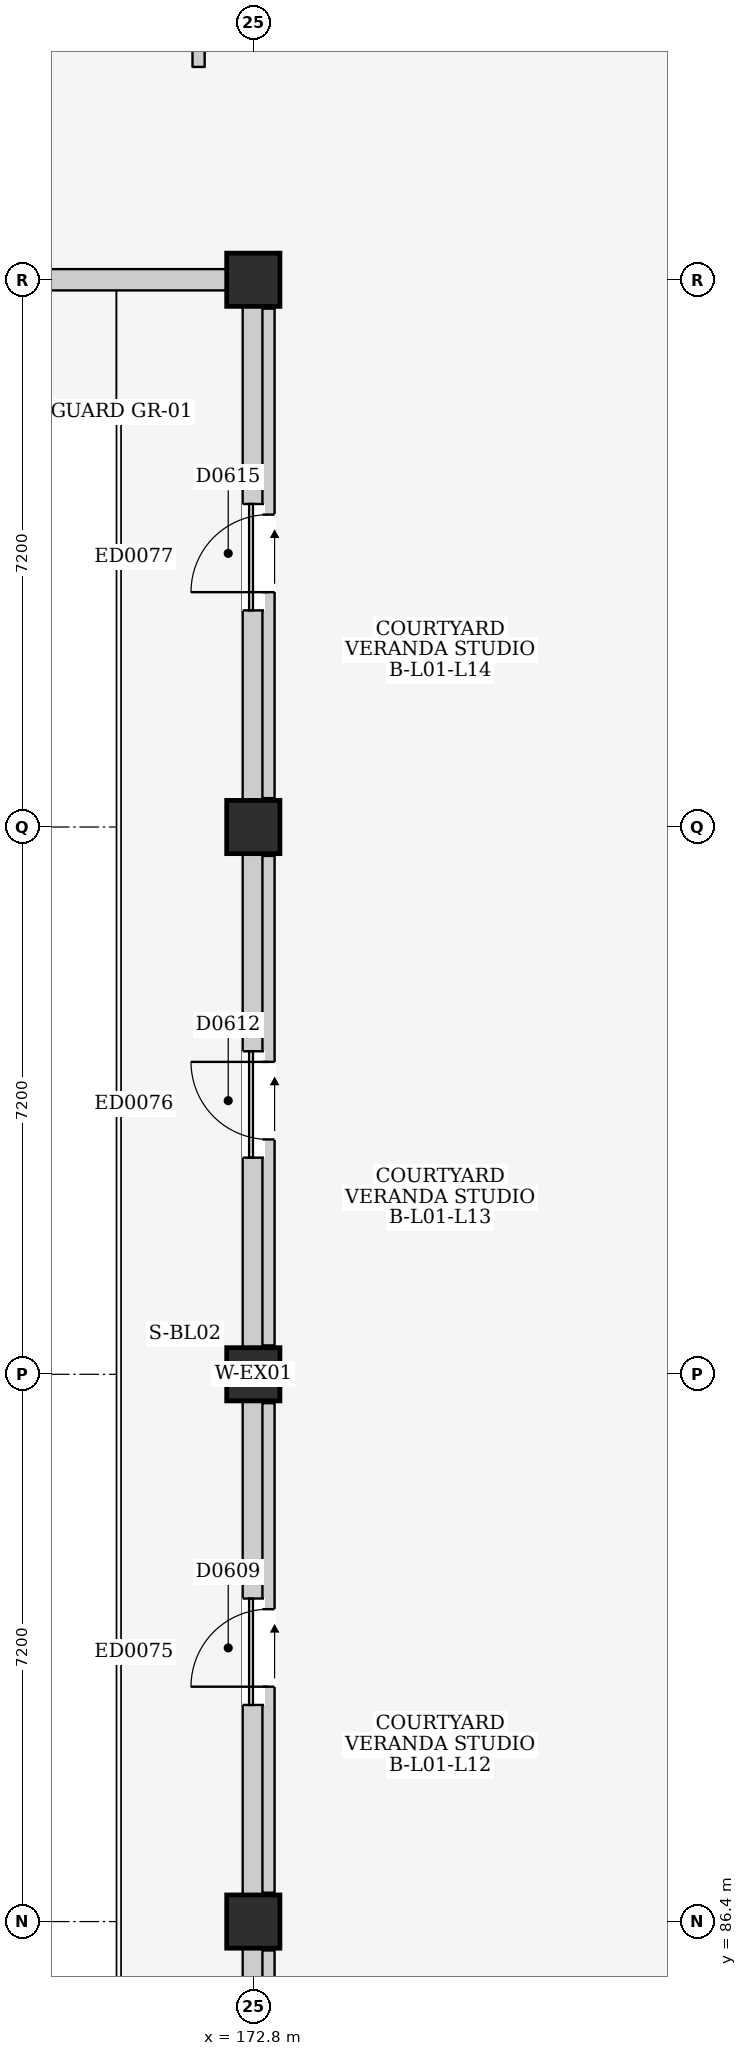
"""IFC4 building model, lengths in metres.
Left out: names, types, materials, properties, quantities, classifications, styles, units other than length and angle.
Written with IfcOpenShell. Run it as: python <this file> out.ifc"""

import sys

from ifc_helpers import new_model, si_unit, direction, frame, frame_2d, origin, origin_2d, place, context, subcontext, project, spatial, rectangle, extrude, element, fill, save


model = new_model("IFC4")
c1 = context("Model", 3, precision=1e-05, world=origin(), true_north=direction((0.0, 1.0)))
c2 = subcontext(c1, "Body", "Model", "MODEL_VIEW")
j1 = project(units=[si_unit("LENGTHUNIT", "METRE"), si_unit("PLANEANGLEUNIT", "RADIAN")], contexts=[c1])
p1 = place(None, origin())
s1 = spatial("IfcSite", under=j1, at=p1, CompositionType="ELEMENT")
p2 = place(p1, origin())
s2 = spatial("IfcBuilding", under=s1, at=p2, CompositionType="ELEMENT")
p3 = place(p2, frame((0.0, 0.0, 4.5)))
s3 = spatial("IfcBuildingStorey", under=s2, at=p3, CompositionType="ELEMENT", Elevation=4.5)
for number, where, z_axis, x_axis in (
    (1, (172.8, 86.4, 0.0), (0.0, 0.0, 1.0), (1.0, 0.0, 0.0)),
    (2, (172.8, 93.6, 0.0), (0.0, 0.0, 1.0), (1.0, 0.0, 0.0)),
    (3, (172.8, 100.8, 0.0), (0.0, 0.0, 1.0), (1.0, 0.0, 0.0)),
    (4, (172.8, 108.0, 0.0), (0.0, 0.0, 1.0), (1.0, 0.0, 0.0)),
):
    element("IfcColumn", number, at=place(p3, frame(where, z_axis=z_axis, x_axis=x_axis)), inside=s3, PredefinedType="COLUMN", context=c2, shape_type="SweptSolid", body=[
        extrude(rectangle(XDim=0.7, YDim=0.7, at=origin_2d()), origin(), (0.0, 0.0, 1.0), 4.5),
    ])
p4 = place(p3, frame((165.95, 108.0, 0.0), z_axis=(0.0, 0.0, 1.0), x_axis=(1.0, 0.0, 0.0)))
e5 = element("IfcWall", 5, at=p4, inside=s3, PredefinedType="ELEMENTEDWALL", context=c2, shape_type="SweptSolid", body=[
    extrude(rectangle(XDim=6.5, YDim=0.28, at=frame_2d((3.25, 0.0))), origin(), (0.0, 0.0, 1.0), 3.635),
])
p5 = place(p4, frame((2.75, 0.0, 1.2)))
e6 = element("IfcOpeningElement", 6, at=p5, cuts=e5, PredefinedType="OPENING", context=c2, shape_type="SweptSolid", body=[
    extrude(rectangle(XDim=1.0, YDim=0.9, at=frame_2d((0.5, 0.45))), frame((0.0, 0.155, 0.0), z_axis=(0.0, -1.0, 0.0), x_axis=(1.0, 0.0, 0.0)), (0.0, 0.0, 1.0), 0.31),
])
p6 = place(p3, frame((172.8, 79.55, 0.0), z_axis=(0.0, 0.0, 1.0), x_axis=(0.0, 1.0, 0.0)))
e7 = element("IfcWall", 7, at=p6, inside=s3, PredefinedType="ELEMENTEDWALL", context=c2, shape_type="SweptSolid", body=[
    extrude(rectangle(XDim=6.5, YDim=0.28, at=frame_2d((3.25, 0.0))), origin(), (0.0, 0.0, 1.0), 3.685),
])
p7 = place(p6, frame((2.5, 0.0, 0.0)))
e8 = element("IfcOpeningElement", 8, at=p7, cuts=e7, PredefinedType="OPENING", context=c2, shape_type="SweptSolid", body=[
    extrude(rectangle(XDim=1.4, YDim=2.1, at=frame_2d((0.7, 1.05))), frame((0.0, 0.155, 0.0), z_axis=(0.0, -1.0, 0.0), x_axis=(1.0, 0.0, 0.0)), (0.0, 0.0, 1.0), 0.31),
])
p8 = place(p3, frame((172.8, 86.75, 0.0), z_axis=(0.0, 0.0, 1.0), x_axis=(0.0, 1.0, 0.0)))
e9 = element("IfcWall", 9, at=p8, inside=s3, PredefinedType="ELEMENTEDWALL", context=c2, shape_type="SweptSolid", body=[
    extrude(rectangle(XDim=6.5, YDim=0.28, at=frame_2d((3.25, 0.0))), origin(), (0.0, 0.0, 1.0), 3.685),
])
p9 = place(p8, frame((2.5, 0.0, 0.0)))
e10 = element("IfcOpeningElement", 10, at=p9, cuts=e9, PredefinedType="OPENING", context=c2, shape_type="SweptSolid", body=[
    extrude(rectangle(XDim=1.4, YDim=2.1, at=frame_2d((0.7, 1.05))), frame((0.0, 0.155, 0.0), z_axis=(0.0, -1.0, 0.0), x_axis=(1.0, 0.0, 0.0)), (0.0, 0.0, 1.0), 0.31),
])
p10 = place(p3, frame((172.8, 93.95, 0.0), z_axis=(0.0, 0.0, 1.0), x_axis=(0.0, 1.0, 0.0)))
e11 = element("IfcWall", 11, at=p10, inside=s3, PredefinedType="ELEMENTEDWALL", context=c2, shape_type="SweptSolid", body=[
    extrude(rectangle(XDim=6.5, YDim=0.28, at=frame_2d((3.25, 0.0))), origin(), (0.0, 0.0, 1.0), 3.685),
])
p11 = place(p10, frame((2.5, 0.0, 0.0)))
e12 = element("IfcOpeningElement", 12, at=p11, cuts=e11, PredefinedType="OPENING", context=c2, shape_type="SweptSolid", body=[
    extrude(rectangle(XDim=1.4, YDim=2.1, at=frame_2d((0.7, 1.05))), frame((0.0, 0.155, 0.0), z_axis=(0.0, -1.0, 0.0), x_axis=(1.0, 0.0, 0.0)), (0.0, 0.0, 1.0), 0.31),
])
p12 = place(p3, frame((172.8, 101.15, 0.0), z_axis=(0.0, 0.0, 1.0), x_axis=(0.0, 1.0, 0.0)))
e13 = element("IfcWall", 13, at=p12, inside=s3, PredefinedType="ELEMENTEDWALL", context=c2, shape_type="SweptSolid", body=[
    extrude(rectangle(XDim=6.5, YDim=0.28, at=frame_2d((3.25, 0.0))), origin(), (0.0, 0.0, 1.0), 3.685),
])
p13 = place(p12, frame((2.5, 0.0, 0.0)))
e14 = element("IfcOpeningElement", 14, at=p13, cuts=e13, PredefinedType="OPENING", context=c2, shape_type="SweptSolid", body=[
    extrude(rectangle(XDim=1.4, YDim=2.1, at=frame_2d((0.7, 1.05))), frame((0.0, 0.155, 0.0), z_axis=(0.0, -1.0, 0.0), x_axis=(1.0, 0.0, 0.0)), (0.0, 0.0, 1.0), 0.31),
])
p14 = place(p3, frame((172.08, 110.8, 0.0), z_axis=(0.0, 0.0, 1.0), x_axis=(0.0, 1.0, 0.0)))
e15 = element("IfcWall", 15, at=p14, inside=s3, PredefinedType="PARTITIONING", context=c2, shape_type="SweptSolid", body=[
    extrude(rectangle(XDim=4.32, YDim=0.16, at=frame_2d((2.16, 0.0))), origin(), (0.0, 0.0, 1.0), 4.25),
])
p15 = place(p14, frame((2.4, 0.0, 0.0)))
e16 = element("IfcOpeningElement", 16, at=p15, cuts=e15, PredefinedType="OPENING", context=c2, shape_type="SweptSolid", body=[
    extrude(rectangle(XDim=1.2, YDim=2.2, at=frame_2d((0.6, 1.1))), frame((0.0, 0.095, 0.0), z_axis=(0.0, -1.0, 0.0), x_axis=(1.0, 0.0, 0.0)), (0.0, 0.0, 1.0), 0.19),
])
p16 = place(p3, frame((173.0, 79.58, 0.0), z_axis=(0.0, 0.0, 1.0), x_axis=(0.0, 1.0, 0.0)))
e17 = element("IfcWall", 17, at=p16, inside=s3, PredefinedType="PARTITIONING", context=c2, shape_type="SweptSolid", body=[
    extrude(rectangle(XDim=6.44, YDim=0.16, at=frame_2d((3.22, 0.0))), origin(), (0.0, 0.0, 1.0), 3.685),
])
p17 = place(p16, frame((2.71, 0.0, 0.0)))
e18 = element("IfcOpeningElement", 18, at=p17, cuts=e17, PredefinedType="OPENING", context=c2, shape_type="SweptSolid", body=[
    extrude(rectangle(XDim=1.02, YDim=2.18, at=frame_2d((0.51, 1.09))), frame((0.0, 0.095, 0.0), z_axis=(0.0, -1.0, 0.0), x_axis=(1.0, 0.0, 0.0)), (0.0, 0.0, 1.0), 0.19),
])
p18 = place(p3, frame((173.0, 86.78, 0.0), z_axis=(0.0, 0.0, 1.0), x_axis=(0.0, 1.0, 0.0)))
e19 = element("IfcWall", 19, at=p18, inside=s3, PredefinedType="PARTITIONING", context=c2, shape_type="SweptSolid", body=[
    extrude(rectangle(XDim=6.44, YDim=0.16, at=frame_2d((3.22, 0.0))), origin(), (0.0, 0.0, 1.0), 3.685),
])
p19 = place(p18, frame((2.71, 0.0, 0.0)))
e20 = element("IfcOpeningElement", 20, at=p19, cuts=e19, PredefinedType="OPENING", context=c2, shape_type="SweptSolid", body=[
    extrude(rectangle(XDim=1.02, YDim=2.18, at=frame_2d((0.51, 1.09))), frame((0.0, 0.095, 0.0), z_axis=(0.0, -1.0, 0.0), x_axis=(1.0, 0.0, 0.0)), (0.0, 0.0, 1.0), 0.19),
])
p20 = place(p3, frame((173.0, 93.98, 0.0), z_axis=(0.0, 0.0, 1.0), x_axis=(0.0, 1.0, 0.0)))
e21 = element("IfcWall", 21, at=p20, inside=s3, PredefinedType="PARTITIONING", context=c2, shape_type="SweptSolid", body=[
    extrude(rectangle(XDim=6.44, YDim=0.16, at=frame_2d((3.22, 0.0))), origin(), (0.0, 0.0, 1.0), 3.685),
])
p21 = place(p20, frame((2.71, 0.0, 0.0)))
e22 = element("IfcOpeningElement", 22, at=p21, cuts=e21, PredefinedType="OPENING", context=c2, shape_type="SweptSolid", body=[
    extrude(rectangle(XDim=1.02, YDim=2.18, at=frame_2d((0.51, 1.09))), frame((0.0, 0.095, 0.0), z_axis=(0.0, -1.0, 0.0), x_axis=(1.0, 0.0, 0.0)), (0.0, 0.0, 1.0), 0.19),
])
p22 = place(p3, frame((173.0, 101.18, 0.0), z_axis=(0.0, 0.0, 1.0), x_axis=(0.0, 1.0, 0.0)))
e23 = element("IfcWall", 23, at=p22, inside=s3, PredefinedType="PARTITIONING", context=c2, shape_type="SweptSolid", body=[
    extrude(rectangle(XDim=6.44, YDim=0.16, at=frame_2d((3.22, 0.0))), origin(), (0.0, 0.0, 1.0), 3.685),
])
p23 = place(p22, frame((2.71, 0.0, 0.0)))
e24 = element("IfcOpeningElement", 24, at=p23, cuts=e23, PredefinedType="OPENING", context=c2, shape_type="SweptSolid", body=[
    extrude(rectangle(XDim=1.02, YDim=2.18, at=frame_2d((0.51, 1.09))), frame((0.0, 0.095, 0.0), z_axis=(0.0, -1.0, 0.0), x_axis=(1.0, 0.0, 0.0)), (0.0, 0.0, 1.0), 0.19),
])
p24 = place(p9, frame((1.4, 0.0, 0.0), z_axis=(0.0, 0.0, 1.0), x_axis=(-1.0, 0.0, 0.0)))
e25 = element("IfcDoor", 25, at=p24, inside=s3, OperationType="SLIDING_TO_RIGHT", PredefinedType="DOOR", context=c2, shape_type="SweptSolid", body=[
    extrude(rectangle(XDim=1.4, YDim=2.1, at=frame_2d((0.7, 1.05))), frame((0.0, 0.025, 0.0), z_axis=(0.0, -1.0, 0.0), x_axis=(1.0, 0.0, 0.0)), (0.0, 0.0, 1.0), 0.05),
])
fill(e10, e25)
p25 = place(p11, frame((1.4, 0.0, 0.0), z_axis=(0.0, 0.0, 1.0), x_axis=(-1.0, 0.0, 0.0)))
e26 = element("IfcDoor", 26, at=p25, inside=s3, OperationType="SLIDING_TO_RIGHT", PredefinedType="DOOR", context=c2, shape_type="SweptSolid", body=[
    extrude(rectangle(XDim=1.4, YDim=2.1, at=frame_2d((0.7, 1.05))), frame((0.0, 0.025, 0.0), z_axis=(0.0, -1.0, 0.0), x_axis=(1.0, 0.0, 0.0)), (0.0, 0.0, 1.0), 0.05),
])
fill(e12, e26)
p26 = place(p13, frame((1.4, 0.0, 0.0), z_axis=(0.0, 0.0, 1.0), x_axis=(-1.0, 0.0, 0.0)))
e27 = element("IfcDoor", 27, at=p26, inside=s3, OperationType="SLIDING_TO_RIGHT", PredefinedType="DOOR", context=c2, shape_type="SweptSolid", body=[
    extrude(rectangle(XDim=1.4, YDim=2.1, at=frame_2d((0.7, 1.05))), frame((0.0, 0.025, 0.0), z_axis=(0.0, -1.0, 0.0), x_axis=(1.0, 0.0, 0.0)), (0.0, 0.0, 1.0), 0.05),
])
fill(e14, e27)
p27 = place(p19, origin())
e28 = element("IfcDoor", 28, at=p27, inside=s3, OperationType="SINGLE_SWING_LEFT", PredefinedType="DOOR", context=c2, shape_type="SweptSolid", body=[
    extrude(rectangle(XDim=1.02, YDim=2.18, at=frame_2d((0.51, 1.09))), frame((0.0, 0.025, 0.0), z_axis=(0.0, -1.0, 0.0), x_axis=(1.0, 0.0, 0.0)), (0.0, 0.0, 1.0), 0.05),
])
fill(e20, e28)
p28 = place(p21, origin())
e29 = element("IfcDoor", 29, at=p28, inside=s3, OperationType="SINGLE_SWING_RIGHT", PredefinedType="DOOR", context=c2, shape_type="SweptSolid", body=[
    extrude(rectangle(XDim=1.02, YDim=2.18, at=frame_2d((0.51, 1.09))), frame((0.0, 0.025, 0.0), z_axis=(0.0, -1.0, 0.0), x_axis=(1.0, 0.0, 0.0)), (0.0, 0.0, 1.0), 0.05),
])
fill(e22, e29)
p29 = place(p23, origin())
e30 = element("IfcDoor", 30, at=p29, inside=s3, OperationType="SINGLE_SWING_LEFT", PredefinedType="DOOR", context=c2, shape_type="SweptSolid", body=[
    extrude(rectangle(XDim=1.02, YDim=2.18, at=frame_2d((0.51, 1.09))), frame((0.0, 0.025, 0.0), z_axis=(0.0, -1.0, 0.0), x_axis=(1.0, 0.0, 0.0)), (0.0, 0.0, 1.0), 0.05),
])
fill(e24, e30)
save(model, sys.argv[1])
